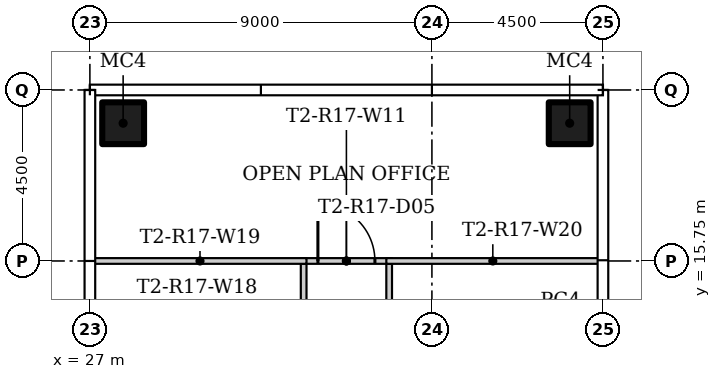
"""IFC4 building model, lengths in metres.
Left out: names, types, materials, properties, quantities, classifications, styles, units other than length and angle.
Written with IfcOpenShell. Run it as: python <this file> out.ifc"""

import sys

from ifc_helpers import new_model, si_unit, direction, frame, frame_2d, origin, origin_2d, place, context, subcontext, project, spatial, rectangle, hollow_rectangle, extrude, element, fill, save


model = new_model("IFC4")
c1 = context("Model", 3, precision=1e-05, world=origin(), true_north=direction((0.0, 1.0)))
c2 = subcontext(c1, "Body", "Model", "MODEL_VIEW")
j1 = project(units=[si_unit("LENGTHUNIT", "METRE"), si_unit("PLANEANGLEUNIT", "RADIAN")], contexts=[c1])
p1 = place(None, origin())
s1 = spatial("IfcSite", under=j1, at=p1, CompositionType="ELEMENT")
p2 = place(p1, origin())
s2 = spatial("IfcBuilding", under=s1, at=p2, CompositionType="ELEMENT")
p3 = place(p2, frame((0.0, 0.0, 150.6)))
s3 = spatial("IfcBuildingStorey", under=s2, at=p3, CompositionType="ELEMENT", Elevation=150.6)
for number, where in (
    (1, (39.625, 19.375, 0.0)),
    (2, (27.875, 19.375, 0.0)),
):
    element("IfcColumn", number, at=place(p3, frame(where)), inside=s3, PredefinedType="COLUMN", context=c2, shape_type="SweptSolid", body=[
        extrude(hollow_rectangle(XDim=1.1, YDim=1.1, WallThickness=0.04, at=origin_2d()), origin(), (0.0, 0.0, 1.0), 3.55),
    ])
p4 = place(p3, frame((34.875, 15.675, 0.0), z_axis=(0.0, 0.0, 1.0), x_axis=(0.0, -1.0, 0.0)))
e3 = element("IfcWall", 3, at=p4, inside=s3, PredefinedType="PARTITIONING", context=c2, shape_type="SweptSolid", body=[
    extrude(rectangle(XDim=13.15, YDim=0.15, at=frame_2d((6.575, 0.0))), origin(), (0.0, 0.0, 1.0), 3.55),
])
p5 = place(p4, frame((3.675, 0.0, 0.0)))
e4 = element("IfcOpeningElement", 4, at=p5, cuts=e3, PredefinedType="OPENING", context=c2, shape_type="SweptSolid", body=[
    extrude(rectangle(XDim=1.5, YDim=2.1, at=frame_2d((0.75, 1.05))), frame((0.0, 0.085, 0.0), z_axis=(0.0, -1.0, 0.0), x_axis=(1.0, 0.0, 0.0)), (0.0, 0.0, 1.0), 0.17),
])
p6 = place(p3, frame((32.625, 6.825, 0.0), z_axis=(0.0, 0.0, 1.0), x_axis=(0.0, 1.0, 0.0)))
e5 = element("IfcWall", 5, at=p6, inside=s3, PredefinedType="PARTITIONING", context=c2, shape_type="SweptSolid", body=[
    extrude(rectangle(XDim=8.85, YDim=0.15, at=frame_2d((4.425, 0.0))), origin(), (0.0, 0.0, 1.0), 3.55),
])
p7 = place(p6, frame((6.175, 0.0, 0.0)))
e6 = element("IfcOpeningElement", 6, at=p7, cuts=e5, PredefinedType="OPENING", context=c2, shape_type="SweptSolid", body=[
    extrude(rectangle(XDim=1.0, YDim=2.4, at=frame_2d((0.5, 1.2))), frame((0.0, 0.085, 0.0), z_axis=(0.0, -1.0, 0.0), x_axis=(1.0, 0.0, 0.0)), (0.0, 0.0, 1.0), 0.17),
])
p8 = place(p6, frame((1.425, 0.0, 0.0)))
e7 = element("IfcOpeningElement", 7, at=p8, cuts=e5, PredefinedType="OPENING", context=c2, shape_type="SweptSolid", body=[
    extrude(rectangle(XDim=1.5, YDim=2.1, at=frame_2d((0.75, 1.05))), frame((0.0, 0.085, 0.0), z_axis=(0.0, -1.0, 0.0), x_axis=(1.0, 0.0, 0.0)), (0.0, 0.0, 1.0), 0.17),
])
p9 = place(p3, frame((32.55, 15.75, 0.0)))
e8 = element("IfcWall", 8, at=p9, inside=s3, PredefinedType="PARTITIONING", context=c2, shape_type="SweptSolid", body=[
    extrude(rectangle(XDim=2.4, YDim=0.15, at=frame_2d((1.2, 0.0))), origin(), (0.0, 0.0, 1.0), 3.55),
])
p10 = place(p9, frame((0.45, 0.0, 0.0)))
e9 = element("IfcOpeningElement", 9, at=p10, cuts=e8, PredefinedType="OPENING", context=c2, shape_type="SweptSolid", body=[
    extrude(rectangle(XDim=1.5, YDim=2.1, at=frame_2d((0.75, 1.05))), frame((0.0, 0.085, 0.0), z_axis=(0.0, -1.0, 0.0), x_axis=(1.0, 0.0, 0.0)), (0.0, 0.0, 1.0), 0.17),
])
for number, where, z_axis, x_axis in (
    (10, (32.7, 15.75, 0.0), (0.0, 0.0, 1.0), (-1.0, 0.0, 0.0)),
    (11, (40.405, 15.75, 0.0), (0.0, 0.0, 1.0), (-1.0, 0.0, 0.0)),
):
    element("IfcWall", number, at=place(p3, frame(where, z_axis=z_axis, x_axis=x_axis)), inside=s3, PredefinedType="PARTITIONING", context=c2, shape_type="SweptSolid", body=[
        extrude(rectangle(XDim=5.605, YDim=0.15, at=frame_2d((2.802, 0.0))), origin(), (0.0, 0.0, 1.0), 3.55),
    ])
p11 = place(p10, origin())
e12 = element("IfcDoor", 12, at=p11, inside=s3, OperationType="DOUBLE_DOOR_SINGLE_SWING", PredefinedType="DOOR", context=c2, shape_type="SweptSolid", body=[
    extrude(rectangle(XDim=1.5, YDim=2.1, at=frame_2d((0.75, 1.05))), frame((0.0, 0.025, 0.0), z_axis=(0.0, -1.0, 0.0), x_axis=(1.0, 0.0, 0.0)), (0.0, 0.0, 1.0), 0.05),
])
fill(e9, e12)
save(model, sys.argv[1])
